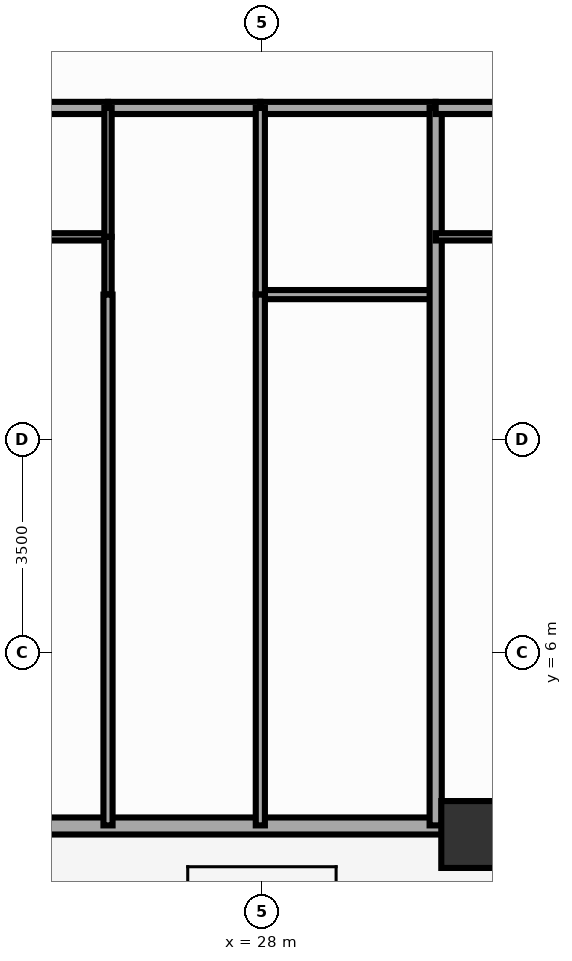
"""IFC4 building model, lengths in metres.
Left out: names, types, materials, properties, quantities, classifications, styles, units other than length and angle.
Written with IfcOpenShell. Run it as: python <this file> out.ifc"""

import sys

from ifc_helpers import new_model, si_unit, direction, frame, frame_2d, origin, origin_2d, place, context, subcontext, project, spatial, rectangle, extrude, source, transform, mapped, element, fill, save


model = new_model("IFC4")
c1 = context("Model", 3, precision=1e-05, world=origin(), true_north=direction((0.0, 1.0)))
c2 = subcontext(c1, "Body", "Model", "MODEL_VIEW")
j1 = project(units=[si_unit("LENGTHUNIT", "METRE"), si_unit("PLANEANGLEUNIT", "RADIAN")], contexts=[c1])
p1 = place(None, origin())
s1 = spatial("IfcSite", under=j1, at=p1, CompositionType="ELEMENT")
p2 = place(p1, origin())
s2 = spatial("IfcBuilding", under=s1, at=p2, CompositionType="ELEMENT")
p3 = place(p2, frame((0.0, 0.0, 19.4)))
s3 = spatial("IfcBuildingStorey", under=s2, at=p3, CompositionType="ELEMENT", Elevation=19.4)
m1 = source(origin(), c2, "Body", "SweptSolid", [
    extrude(rectangle(XDim=1.1, YDim=1.1, at=origin_2d()), origin(), (0.0, 0.0, 1.0), 3.0),
])
p4 = place(p3, frame((31.5, 3.0, 0.0), z_axis=(0.0, 0.0, 1.0), x_axis=(1.0, 0.0, 0.0)))
e1 = element("IfcColumn", 1, at=p4, inside=s3, PredefinedType="COLUMN", context=c2, shape_type="MappedRepresentation", body=[
    mapped(m1, transform((0.0, 0.0, 0.0), scale=1.0)),
])
p5 = place(p3, frame((15.5, 3.14, 0.0), z_axis=(0.0, 0.0, 1.0), x_axis=(1.0, 0.0, 0.0)))
e2 = element("IfcWall", 2, at=p5, inside=s3, PredefinedType="SOLIDWALL", context=c2, shape_type="SweptSolid", body=[
    extrude(rectangle(XDim=45.0, YDim=0.28, at=frame_2d((22.5, 0.0))), origin(), (0.0, 0.0, 1.0), 2.28),
])
p6 = place(p5, frame((0.785, 0.0, 0.25)))
e3 = element("IfcOpeningElement", 3, at=p6, cuts=e2, PredefinedType="OPENING", context=c2, shape_type="SweptSolid", body=[
    extrude(rectangle(XDim=1.2, YDim=1.5, at=frame_2d((0.6, 0.75))), frame((0.0, 0.152, 0.0), z_axis=(0.0, -1.0, 0.0), x_axis=(1.0, 0.0, 0.0)), (0.0, 0.0, 1.0), 0.304),
])
p7 = place(p5, frame((3.033, 0.0, 0.25)))
e4 = element("IfcOpeningElement", 4, at=p7, cuts=e2, PredefinedType="OPENING", context=c2, shape_type="SweptSolid", body=[
    extrude(rectangle(XDim=1.2, YDim=1.5, at=frame_2d((0.6, 0.75))), frame((0.0, 0.152, 0.0), z_axis=(0.0, -1.0, 0.0), x_axis=(1.0, 0.0, 0.0)), (0.0, 0.0, 1.0), 0.304),
])
p8 = place(p5, frame((5.727, 0.0, 0.25)))
e5 = element("IfcOpeningElement", 5, at=p8, cuts=e2, PredefinedType="OPENING", context=c2, shape_type="SweptSolid", body=[
    extrude(rectangle(XDim=1.2, YDim=1.5, at=frame_2d((0.6, 0.75))), frame((0.0, 0.152, 0.0), z_axis=(0.0, -1.0, 0.0), x_axis=(1.0, 0.0, 0.0)), (0.0, 0.0, 1.0), 0.304),
])
p9 = place(p5, frame((8.269, 0.0, 0.25)))
e6 = element("IfcOpeningElement", 6, at=p9, cuts=e2, PredefinedType="OPENING", context=c2, shape_type="SweptSolid", body=[
    extrude(rectangle(XDim=1.2, YDim=1.5, at=frame_2d((0.6, 0.75))), frame((0.0, 0.152, 0.0), z_axis=(0.0, -1.0, 0.0), x_axis=(1.0, 0.0, 0.0)), (0.0, 0.0, 1.0), 0.304),
])
p10 = place(p5, frame((10.621, 0.0, 0.25)))
e7 = element("IfcOpeningElement", 7, at=p10, cuts=e2, PredefinedType="OPENING", context=c2, shape_type="SweptSolid", body=[
    extrude(rectangle(XDim=1.2, YDim=1.5, at=frame_2d((0.6, 0.75))), frame((0.0, 0.152, 0.0), z_axis=(0.0, -1.0, 0.0), x_axis=(1.0, 0.0, 0.0)), (0.0, 0.0, 1.0), 0.304),
])
p11 = place(p5, frame((13.316, 0.0, 0.25)))
e8 = element("IfcOpeningElement", 8, at=p11, cuts=e2, PredefinedType="OPENING", context=c2, shape_type="SweptSolid", body=[
    extrude(rectangle(XDim=1.2, YDim=1.5, at=frame_2d((0.6, 0.75))), frame((0.0, 0.152, 0.0), z_axis=(0.0, -1.0, 0.0), x_axis=(1.0, 0.0, 0.0)), (0.0, 0.0, 1.0), 0.304),
])
p12 = place(p5, frame((16.624, 0.0, 0.25)))
e9 = element("IfcOpeningElement", 9, at=p12, cuts=e2, PredefinedType="OPENING", context=c2, shape_type="SweptSolid", body=[
    extrude(rectangle(XDim=0.7, YDim=1.5, at=frame_2d((0.35, 0.75))), frame((0.0, 0.152, 0.0), z_axis=(0.0, -1.0, 0.0), x_axis=(1.0, 0.0, 0.0)), (0.0, 0.0, 1.0), 0.304),
])
p13 = place(p5, frame((18.141, 0.0, 0.25)))
e10 = element("IfcOpeningElement", 10, at=p13, cuts=e2, PredefinedType="OPENING", context=c2, shape_type="SweptSolid", body=[
    extrude(rectangle(XDim=1.2, YDim=1.5, at=frame_2d((0.6, 0.75))), frame((0.0, 0.152, 0.0), z_axis=(0.0, -1.0, 0.0), x_axis=(1.0, 0.0, 0.0)), (0.0, 0.0, 1.0), 0.304),
])
p14 = place(p5, frame((21.874, 0.0, 0.0), z_axis=(0.0, 0.0, 1.0), x_axis=(-1.0, 0.0, 0.0)))
e11 = element("IfcOpeningElement", 11, at=p14, cuts=e2, PredefinedType="OPENING", context=c2, shape_type="SweptSolid", body=[
    extrude(rectangle(XDim=1.1, YDim=2.15, at=frame_2d((0.55, 1.075))), frame((0.0, 0.152, 0.0), z_axis=(0.0, -1.0, 0.0), x_axis=(1.0, 0.0, 0.0)), (0.0, 0.0, 1.0), 0.304),
])
p15 = place(p5, frame((23.223, 0.0, 0.25)))
e12 = element("IfcOpeningElement", 12, at=p15, cuts=e2, PredefinedType="OPENING", context=c2, shape_type="SweptSolid", body=[
    extrude(rectangle(XDim=1.2, YDim=1.5, at=frame_2d((0.6, 0.75))), frame((0.0, 0.152, 0.0), z_axis=(0.0, -1.0, 0.0), x_axis=(1.0, 0.0, 0.0)), (0.0, 0.0, 1.0), 0.304),
])
p16 = place(p5, frame((25.507, 0.0, 0.25)))
e13 = element("IfcOpeningElement", 13, at=p16, cuts=e2, PredefinedType="OPENING", context=c2, shape_type="SweptSolid", body=[
    extrude(rectangle(XDim=1.2, YDim=1.5, at=frame_2d((0.6, 0.75))), frame((0.0, 0.152, 0.0), z_axis=(0.0, -1.0, 0.0), x_axis=(1.0, 0.0, 0.0)), (0.0, 0.0, 1.0), 0.304),
])
p17 = place(p5, frame((27.6, 0.0, 0.25)))
e14 = element("IfcOpeningElement", 14, at=p17, cuts=e2, PredefinedType="OPENING", context=c2, shape_type="SweptSolid", body=[
    extrude(rectangle(XDim=0.7, YDim=1.5, at=frame_2d((0.35, 0.75))), frame((0.0, 0.152, 0.0), z_axis=(0.0, -1.0, 0.0), x_axis=(1.0, 0.0, 0.0)), (0.0, 0.0, 1.0), 0.304),
])
p18 = place(p5, frame((30.589, 0.0, 0.25)))
e15 = element("IfcOpeningElement", 15, at=p18, cuts=e2, PredefinedType="OPENING", context=c2, shape_type="SweptSolid", body=[
    extrude(rectangle(XDim=1.2, YDim=1.5, at=frame_2d((0.6, 0.75))), frame((0.0, 0.152, 0.0), z_axis=(0.0, -1.0, 0.0), x_axis=(1.0, 0.0, 0.0)), (0.0, 0.0, 1.0), 0.304),
])
p19 = place(p5, frame((32.872, 0.0, 0.25)))
e16 = element("IfcOpeningElement", 16, at=p19, cuts=e2, PredefinedType="OPENING", context=c2, shape_type="SweptSolid", body=[
    extrude(rectangle(XDim=1.2, YDim=1.5, at=frame_2d((0.6, 0.75))), frame((0.0, 0.152, 0.0), z_axis=(0.0, -1.0, 0.0), x_axis=(1.0, 0.0, 0.0)), (0.0, 0.0, 1.0), 0.304),
])
p20 = place(p5, frame((35.455, 0.0, 0.25)))
e17 = element("IfcOpeningElement", 17, at=p20, cuts=e2, PredefinedType="OPENING", context=c2, shape_type="SweptSolid", body=[
    extrude(rectangle(XDim=1.2, YDim=1.5, at=frame_2d((0.6, 0.75))), frame((0.0, 0.152, 0.0), z_axis=(0.0, -1.0, 0.0), x_axis=(1.0, 0.0, 0.0)), (0.0, 0.0, 1.0), 0.304),
])
p21 = place(p5, frame((37.954, 0.0, 0.25)))
e18 = element("IfcOpeningElement", 18, at=p21, cuts=e2, PredefinedType="OPENING", context=c2, shape_type="SweptSolid", body=[
    extrude(rectangle(XDim=1.2, YDim=1.5, at=frame_2d((0.6, 0.75))), frame((0.0, 0.152, 0.0), z_axis=(0.0, -1.0, 0.0), x_axis=(1.0, 0.0, 0.0)), (0.0, 0.0, 1.0), 0.304),
])
p22 = place(p5, frame((40.238, 0.0, 0.25)))
e19 = element("IfcOpeningElement", 19, at=p22, cuts=e2, PredefinedType="OPENING", context=c2, shape_type="SweptSolid", body=[
    extrude(rectangle(XDim=1.2, YDim=1.5, at=frame_2d((0.6, 0.75))), frame((0.0, 0.152, 0.0), z_axis=(0.0, -1.0, 0.0), x_axis=(1.0, 0.0, 0.0)), (0.0, 0.0, 1.0), 0.304),
])
p23 = place(p5, frame((42.716, 0.0, 0.25)))
e20 = element("IfcOpeningElement", 20, at=p23, cuts=e2, PredefinedType="OPENING", context=c2, shape_type="SweptSolid", body=[
    extrude(rectangle(XDim=1.2, YDim=1.5, at=frame_2d((0.6, 0.75))), frame((0.0, 0.152, 0.0), z_axis=(0.0, -1.0, 0.0), x_axis=(1.0, 0.0, 0.0)), (0.0, 0.0, 1.0), 0.304),
])
p24 = place(p3, frame((23.269, 14.95, 0.0), z_axis=(0.0, 0.0, 1.0), x_axis=(1.0, 0.0, 0.0)))
e21 = element("IfcWall", 21, at=p24, inside=s3, PredefinedType="PARTITIONING", context=c2, shape_type="SweptSolid", body=[
    extrude(rectangle(XDim=2.2, YDim=0.2, at=frame_2d((1.1, 0.0))), origin(), (0.0, 0.0, 1.0), 2.79),
])
p25 = place(p3, frame((25.469, 14.95, 0.0), z_axis=(0.0, 0.0, 1.0), x_axis=(1.0, 0.0, 0.0)))
e22 = element("IfcWall", 22, at=p25, inside=s3, PredefinedType="PARTITIONING", context=c2, shape_type="SweptSolid", body=[
    extrude(rectangle(XDim=2.505, YDim=0.2, at=frame_2d((1.252, 0.0))), origin(), (0.0, 0.0, 1.0), 2.79),
])
p26 = place(p25, frame((0.752, 0.0, 0.0)))
e23 = element("IfcOpeningElement", 23, at=p26, cuts=e22, PredefinedType="OPENING", context=c2, shape_type="SweptSolid", body=[
    extrude(rectangle(XDim=1.0, YDim=2.15, at=frame_2d((0.5, 1.075))), frame((0.0, 0.112, 0.0), z_axis=(0.0, -1.0, 0.0), x_axis=(1.0, 0.0, 0.0)), (0.0, 0.0, 1.0), 0.224),
])
p27 = place(p3, frame((27.974, 14.95, 0.0), z_axis=(0.0, 0.0, 1.0), x_axis=(1.0, 0.0, 0.0)))
e24 = element("IfcWall", 24, at=p27, inside=s3, PredefinedType="PARTITIONING", context=c2, shape_type="SweptSolid", body=[
    extrude(rectangle(XDim=2.884, YDim=0.2, at=frame_2d((1.442, 0.0))), origin(), (0.0, 0.0, 1.0), 2.79),
])
p28 = place(p3, frame((23.269, 12.83, 0.0), z_axis=(0.0, 0.0, 1.0), x_axis=(1.0, 0.0, 0.0)))
e25 = element("IfcWall", 25, at=p28, inside=s3, PredefinedType="PARTITIONING", context=c2, shape_type="SweptSolid", body=[
    extrude(rectangle(XDim=2.2, YDim=0.12, at=frame_2d((1.1, 0.0))), origin(), (0.0, 0.0, 1.0), 2.79),
])
p29 = place(p3, frame((27.974, 11.88, 0.0), z_axis=(0.0, 0.0, 1.0), x_axis=(1.0, 0.0, 0.0)))
e26 = element("IfcWall", 26, at=p29, inside=s3, PredefinedType="PARTITIONING", context=c2, shape_type="SweptSolid", body=[
    extrude(rectangle(XDim=2.884, YDim=0.15, at=frame_2d((1.442, 0.0))), origin(), (0.0, 0.0, 1.0), 2.79),
])
p30 = place(p3, frame((25.469, 14.95, 0.0), z_axis=(0.0, 0.0, 1.0), x_axis=(0.0, -1.0, 0.0)))
e27 = element("IfcWall", 27, at=p30, inside=s3, PredefinedType="PARTITIONING", context=c2, shape_type="SweptSolid", body=[
    extrude(rectangle(XDim=2.12, YDim=0.12, at=frame_2d((1.06, 0.0))), origin(), (0.0, 0.0, 1.0), 2.79),
])
p31 = place(p30, frame((0.635, 0.0, 0.0)))
e28 = element("IfcOpeningElement", 28, at=p31, cuts=e27, PredefinedType="OPENING", context=c2, shape_type="SweptSolid", body=[
    extrude(rectangle(XDim=0.85, YDim=2.05, at=frame_2d((0.425, 1.025))), frame((0.0, 0.072, 0.0), z_axis=(0.0, -1.0, 0.0), x_axis=(1.0, 0.0, 0.0)), (0.0, 0.0, 1.0), 0.144),
])
p32 = place(p3, frame((25.469, 12.83, 0.0), z_axis=(0.0, 0.0, 1.0), x_axis=(0.0, -1.0, 0.0)))
e29 = element("IfcWall", 29, at=p32, inside=s3, PredefinedType="PARTITIONING", context=c2, shape_type="SweptSolid", body=[
    extrude(rectangle(XDim=0.95, YDim=0.12, at=frame_2d((0.475, 0.0))), origin(), (0.0, 0.0, 1.0), 2.79),
])
p33 = place(p3, frame((25.469, 11.88, 0.0), z_axis=(0.0, 0.0, 1.0), x_axis=(0.0, -1.0, 0.0)))
e30 = element("IfcWall", 30, at=p33, inside=s3, PredefinedType="PARTITIONING", context=c2, shape_type="SweptSolid", body=[
    extrude(rectangle(XDim=8.73, YDim=0.15, at=frame_2d((4.365, 0.0))), origin(), (0.0, 0.0, 1.0), 2.79),
])
p34 = place(p33, frame((3.609, 0.0, 0.0)))
e31 = element("IfcOpeningElement", 31, at=p34, cuts=e30, PredefinedType="OPENING", context=c2, shape_type="SweptSolid", body=[
    extrude(rectangle(XDim=0.9, YDim=2.1, at=frame_2d((0.45, 1.05))), frame((0.0, 0.087, 0.0), z_axis=(0.0, -1.0, 0.0), x_axis=(1.0, 0.0, 0.0)), (0.0, 0.0, 1.0), 0.174),
])
p35 = place(p3, frame((27.974, 14.95, 0.0), z_axis=(0.0, 0.0, 1.0), x_axis=(0.0, -1.0, 0.0)))
e32 = element("IfcWall", 32, at=p35, inside=s3, PredefinedType="PARTITIONING", context=c2, shape_type="SweptSolid", body=[
    extrude(rectangle(XDim=3.07, YDim=0.15, at=frame_2d((1.535, 0.0))), origin(), (0.0, 0.0, 1.0), 2.79),
])
p36 = place(p35, frame((1.085, 0.0, 0.0)))
e33 = element("IfcOpeningElement", 33, at=p36, cuts=e32, PredefinedType="OPENING", context=c2, shape_type="SweptSolid", body=[
    extrude(rectangle(XDim=0.9, YDim=2.1, at=frame_2d((0.45, 1.05))), frame((0.0, 0.087, 0.0), z_axis=(0.0, -1.0, 0.0), x_axis=(1.0, 0.0, 0.0)), (0.0, 0.0, 1.0), 0.174),
])
p37 = place(p3, frame((27.974, 11.88, 0.0), z_axis=(0.0, 0.0, 1.0), x_axis=(0.0, -1.0, 0.0)))
e34 = element("IfcWall", 34, at=p37, inside=s3, PredefinedType="PARTITIONING", context=c2, shape_type="SweptSolid", body=[
    extrude(rectangle(XDim=8.73, YDim=0.15, at=frame_2d((4.365, 0.0))), origin(), (0.0, 0.0, 1.0), 2.79),
])
p38 = place(p37, frame((3.609, 0.0, 0.0)))
e35 = element("IfcOpeningElement", 35, at=p38, cuts=e34, PredefinedType="OPENING", context=c2, shape_type="SweptSolid", body=[
    extrude(rectangle(XDim=0.9, YDim=2.1, at=frame_2d((0.45, 1.05))), frame((0.0, 0.087, 0.0), z_axis=(0.0, -1.0, 0.0), x_axis=(1.0, 0.0, 0.0)), (0.0, 0.0, 1.0), 0.174),
])
p39 = place(p3, frame((30.858, 14.95, 0.0), z_axis=(0.0, 0.0, 1.0), x_axis=(0.0, -1.0, 0.0)))
e36 = element("IfcWall", 36, at=p39, inside=s3, PredefinedType="PARTITIONING", context=c2, shape_type="SweptSolid", body=[
    extrude(rectangle(XDim=11.8, YDim=0.2, at=frame_2d((5.9, 0.0))), origin(), (0.0, 0.0, 1.0), 2.24),
])
p40 = place(p3, frame((30.858, 14.95, 0.0), z_axis=(0.0, 0.0, 1.0), x_axis=(1.0, 0.0, 0.0)))
e37 = element("IfcWall", 37, at=p40, inside=s3, PredefinedType="PARTITIONING", context=c2, shape_type="SweptSolid", body=[
    extrude(rectangle(XDim=2.2, YDim=0.2, at=frame_2d((1.1, 0.0))), origin(), (0.0, 0.0, 1.0), 2.79),
])
p41 = place(p3, frame((30.858, 12.83, 0.0), z_axis=(0.0, 0.0, 1.0), x_axis=(1.0, 0.0, 0.0)))
e38 = element("IfcWall", 38, at=p41, inside=s3, PredefinedType="PARTITIONING", context=c2, shape_type="SweptSolid", body=[
    extrude(rectangle(XDim=2.2, YDim=0.12, at=frame_2d((1.1, 0.0))), origin(), (0.0, 0.0, 1.0), 2.79),
])
p42 = place(p3, frame((0.0, 0.0, -0.32)))
p43 = place(p42, frame((28.0, 1.25, 0.0)))
p44 = place(p43, frame((0.0, 0.0, 0.27)))
e39 = element("IfcWindow", 39, at=p44, inside=s3, PartitioningType="SINGLE_PANEL", PredefinedType="SKYLIGHT", context=c2, shape_type="SweptSolid", body=[
    extrude(rectangle(XDim=2.2, YDim=2.2, at=origin_2d()), origin(), (0.0, 0.0, 1.0), 0.05),
])
m2 = source(origin(), c2, "Body", "SweptSolid", [
    extrude(rectangle(XDim=1.2, YDim=1.5, at=frame_2d((0.6, 0.75))), frame((0.0, 0.03, 0.0), z_axis=(0.0, -1.0, 0.0), x_axis=(1.0, 0.0, 0.0)), (0.0, 0.0, 1.0), 0.06),
])
p45 = place(p9, origin())
e40 = element("IfcWindow", 40, at=p45, inside=s3, PartitioningType="SINGLE_PANEL", PredefinedType="WINDOW", context=c2, shape_type="MappedRepresentation", body=[
    mapped(m2, transform((0.0, 0.0, 0.0), scale=1.0)),
])
fill(e6, e40)
p46 = place(p10, origin())
e41 = element("IfcWindow", 41, at=p46, inside=s3, PartitioningType="SINGLE_PANEL", PredefinedType="WINDOW", context=c2, shape_type="MappedRepresentation", body=[
    mapped(m2, transform((0.0, 0.0, 0.0), scale=1.0)),
])
fill(e7, e41)
p47 = place(p11, origin())
e42 = element("IfcWindow", 42, at=p47, inside=s3, PartitioningType="SINGLE_PANEL", PredefinedType="WINDOW", context=c2, shape_type="MappedRepresentation", body=[
    mapped(m2, transform((0.0, 0.0, 0.0), scale=1.0)),
])
fill(e8, e42)
m3 = source(origin(), c2, "Body", "SweptSolid", [
    extrude(rectangle(XDim=1.0, YDim=2.15, at=frame_2d((0.5, 1.075))), frame((0.0, 0.025, 0.0), z_axis=(0.0, -1.0, 0.0), x_axis=(1.0, 0.0, 0.0)), (0.0, 0.0, 1.0), 0.05),
])
p48 = place(p26, origin())
e43 = element("IfcDoor", 43, at=p48, inside=s3, OperationType="SINGLE_SWING_RIGHT", PredefinedType="DOOR", context=c2, shape_type="MappedRepresentation", body=[
    mapped(m3, transform((0.0, 0.0, 0.0), scale=1.0)),
])
fill(e23, e43)
m4 = source(origin(), c2, "Body", "SweptSolid", [
    extrude(rectangle(XDim=0.85, YDim=2.05, at=frame_2d((0.425, 1.025))), frame((0.0, 0.025, 0.0), z_axis=(0.0, -1.0, 0.0), x_axis=(1.0, 0.0, 0.0)), (0.0, 0.0, 1.0), 0.05),
])
p49 = place(p31, origin())
e44 = element("IfcDoor", 44, at=p49, inside=s3, OperationType="SINGLE_SWING_LEFT", PredefinedType="DOOR", context=c2, shape_type="MappedRepresentation", body=[
    mapped(m4, transform((0.0, 0.0, 0.0), scale=1.0)),
])
fill(e28, e44)
m5 = source(origin(), c2, "Body", "SweptSolid", [
    extrude(rectangle(XDim=0.9, YDim=2.1, at=frame_2d((0.45, 1.05))), frame((0.0, 0.025, 0.0), z_axis=(0.0, -1.0, 0.0), x_axis=(1.0, 0.0, 0.0)), (0.0, 0.0, 1.0), 0.05),
])
p50 = place(p34, origin())
e45 = element("IfcDoor", 45, at=p50, inside=s3, OperationType="SINGLE_SWING_RIGHT", PredefinedType="DOOR", context=c2, shape_type="MappedRepresentation", body=[
    mapped(m5, transform((0.0, 0.0, 0.0), scale=1.0)),
])
fill(e31, e45)
p51 = place(p36, origin())
e46 = element("IfcDoor", 46, at=p51, inside=s3, OperationType="SINGLE_SWING_LEFT", PredefinedType="DOOR", context=c2, shape_type="MappedRepresentation", body=[
    mapped(m5, transform((0.0, 0.0, 0.0), scale=1.0)),
])
fill(e33, e46)
p52 = place(p38, origin())
e47 = element("IfcDoor", 47, at=p52, inside=s3, OperationType="SINGLE_SWING_RIGHT", PredefinedType="DOOR", context=c2, shape_type="MappedRepresentation", body=[
    mapped(m5, transform((0.0, 0.0, 0.0), scale=1.0)),
])
fill(e35, e47)
save(model, sys.argv[1])
